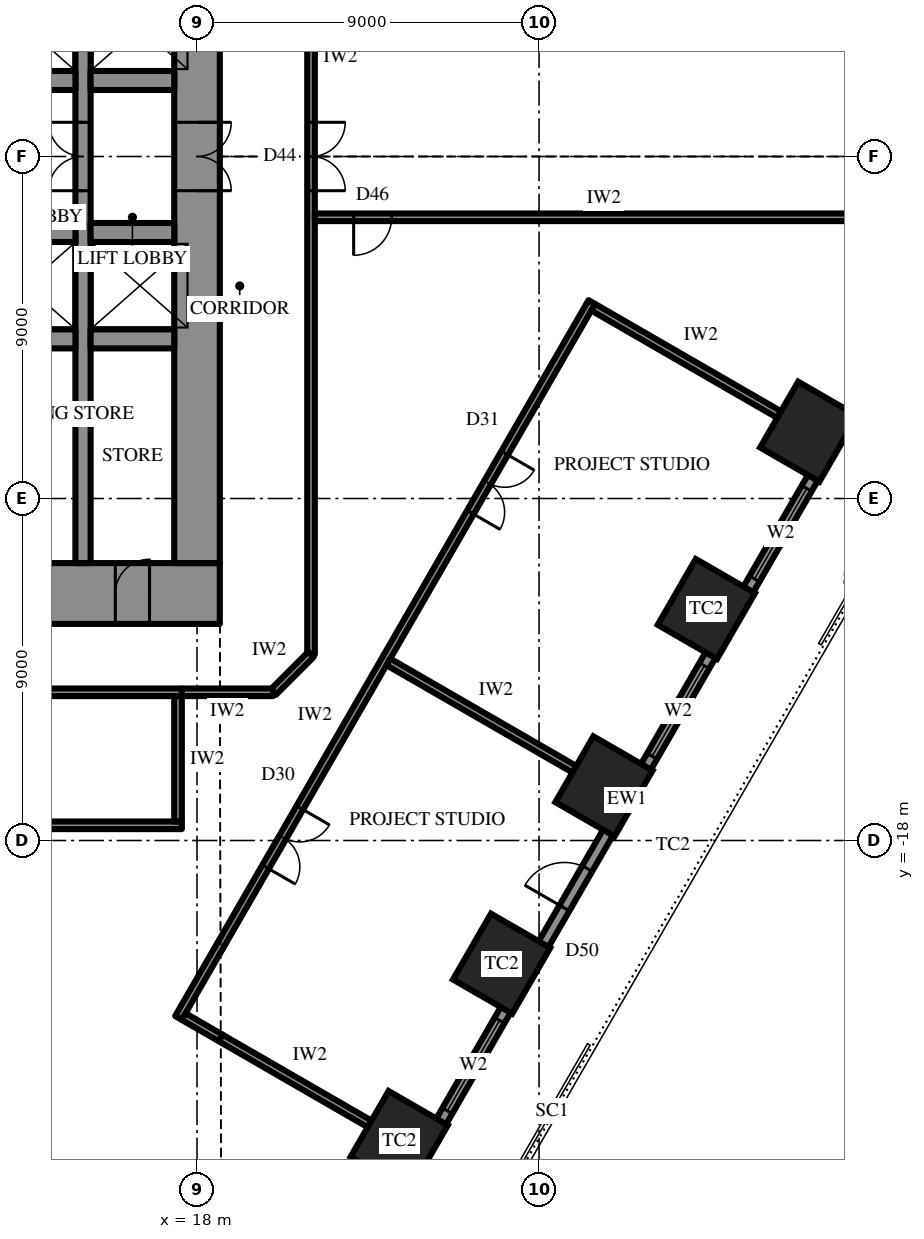
"""IFC4 building model, lengths in metres.
Left out: names, types, materials, properties, quantities, classifications, styles, units other than length and angle.
Written with IfcOpenShell. Run it as: python <this file> out.ifc"""

import sys

from ifc_helpers import new_model, si_unit, direction, frame, frame_2d, origin, origin_2d, place, context, subcontext, project, spatial, rectangle, extrude, element, fill, save


model = new_model("IFC4")
c1 = context("Model", 3, precision=1e-05, world=origin(), true_north=direction((0.0, 1.0)))
c2 = subcontext(c1, "Body", "Model", "MODEL_VIEW")
j1 = project(units=[si_unit("LENGTHUNIT", "METRE"), si_unit("PLANEANGLEUNIT", "RADIAN")], contexts=[c1])
p1 = place(None, origin())
s1 = spatial("IfcSite", under=j1, at=p1, CompositionType="ELEMENT")
p2 = place(p1, origin())
s2 = spatial("IfcBuilding", under=s1, at=p2, CompositionType="ELEMENT")
p3 = place(p2, frame((0.0, 0.0, 52.9)))
s3 = spatial("IfcBuildingStorey", under=s2, at=p3, CompositionType="ELEMENT", Elevation=52.9)
for number, where, z_axis, x_axis in (
    (1, (23.32, -25.908, 0.0), (0.0, 0.0, 1.0), (0.5, 0.866, 0.0)),
    (2, (26.014, -21.242, 0.0), (0.0, 0.0, 1.0), (0.5, 0.866, 0.0)),
    (3, (28.709, -16.575, 0.0), (0.0, 0.0, 1.0), (0.5, 0.866, 0.0)),
    (4, (31.403, -11.908, 0.0), (0.0, 0.0, 1.0), (0.5, 0.866, 0.0)),
    (5, (34.097, -7.242, 0.0), (0.0, 0.0, 1.0), (0.5, 0.866, 0.0)),
):
    element("IfcColumn", number, at=place(p3, frame(where, z_axis=z_axis, x_axis=x_axis)), inside=s3, PredefinedType="COLUMN", context=c2, shape_type="SweptSolid", body=[
        extrude(rectangle(XDim=2.0, YDim=1.8, at=origin_2d()), origin(), (0.0, 0.0, 1.0), 4.2),
    ])
p4 = place(p3, frame((18.6, -11.5, 0.0), z_axis=(0.0, 0.0, 1.0), x_axis=(-1.0, 0.0, 0.0)))
e6 = element("IfcWall", 6, at=p4, inside=s3, PredefinedType="SHEAR", context=c2, shape_type="SweptSolid", body=[
    extrude(rectangle(XDim=37.2, YDim=1.6, at=frame_2d((18.6, 0.0))), origin(), (0.0, 0.0, 1.0), 4.2),
])
p5 = place(p4, frame((19.45, 0.0, 0.0)))
e7 = element("IfcOpeningElement", 7, at=p5, cuts=e6, PredefinedType="OPENING", context=c2, shape_type="SweptSolid", body=[
    extrude(rectangle(XDim=0.9, YDim=2.2, at=frame_2d((0.45, 1.1))), frame((0.0, 0.81, 0.0), z_axis=(0.0, -1.0, 0.0), x_axis=(1.0, 0.0, 0.0)), (0.0, 0.0, 1.0), 1.62),
])
p6 = place(p4, frame((22.45, 0.0, 0.0)))
e8 = element("IfcOpeningElement", 8, at=p6, cuts=e6, PredefinedType="OPENING", context=c2, shape_type="SweptSolid", body=[
    extrude(rectangle(XDim=0.9, YDim=2.2, at=frame_2d((0.45, 1.1))), frame((0.0, 0.81, 0.0), z_axis=(0.0, -1.0, 0.0), x_axis=(1.0, 0.0, 0.0)), (0.0, 0.0, 1.0), 1.62),
])
p7 = place(p4, frame((25.5, 0.0, 0.0)))
e9 = element("IfcOpeningElement", 9, at=p7, cuts=e6, PredefinedType="OPENING", context=c2, shape_type="SweptSolid", body=[
    extrude(rectangle(XDim=1.0, YDim=2.2, at=frame_2d((0.5, 1.1))), frame((0.0, 0.81, 0.0), z_axis=(0.0, -1.0, 0.0), x_axis=(1.0, 0.0, 0.0)), (0.0, 0.0, 1.0), 1.62),
])
p8 = place(p4, frame((1.85, 0.0, 0.0)))
e10 = element("IfcOpeningElement", 10, at=p8, cuts=e6, PredefinedType="OPENING", context=c2, shape_type="SweptSolid", body=[
    extrude(rectangle(XDim=0.9, YDim=2.2, at=frame_2d((0.45, 1.1))), frame((0.0, 0.81, 0.0), z_axis=(0.0, -1.0, 0.0), x_axis=(1.0, 0.0, 0.0)), (0.0, 0.0, 1.0), 1.62),
])
p9 = place(p4, frame((4.6, 0.0, 0.0)))
e11 = element("IfcOpeningElement", 11, at=p9, cuts=e6, PredefinedType="OPENING", context=c2, shape_type="SweptSolid", body=[
    extrude(rectangle(XDim=0.9, YDim=2.2, at=frame_2d((0.45, 1.1))), frame((0.0, 0.81, 0.0), z_axis=(0.0, -1.0, 0.0), x_axis=(1.0, 0.0, 0.0)), (0.0, 0.0, 1.0), 1.62),
])
p10 = place(p4, frame((7.75, 0.0, 0.0)))
e12 = element("IfcOpeningElement", 12, at=p10, cuts=e6, PredefinedType="OPENING", context=c2, shape_type="SweptSolid", body=[
    extrude(rectangle(XDim=0.9, YDim=2.2, at=frame_2d((0.45, 1.1))), frame((0.0, 0.81, 0.0), z_axis=(0.0, -1.0, 0.0), x_axis=(1.0, 0.0, 0.0)), (0.0, 0.0, 1.0), 1.62),
])
p11 = place(p4, frame((28.55, 0.0, 0.0)))
e13 = element("IfcOpeningElement", 13, at=p11, cuts=e6, PredefinedType="OPENING", context=c2, shape_type="SweptSolid", body=[
    extrude(rectangle(XDim=0.9, YDim=2.2, at=frame_2d((0.45, 1.1))), frame((0.0, 0.81, 0.0), z_axis=(0.0, -1.0, 0.0), x_axis=(1.0, 0.0, 0.0)), (0.0, 0.0, 1.0), 1.62),
])
p12 = place(p4, frame((31.7, 0.0, 0.0)))
e14 = element("IfcOpeningElement", 14, at=p12, cuts=e6, PredefinedType="OPENING", context=c2, shape_type="SweptSolid", body=[
    extrude(rectangle(XDim=0.9, YDim=2.2, at=frame_2d((0.45, 1.1))), frame((0.0, 0.81, 0.0), z_axis=(0.0, -1.0, 0.0), x_axis=(1.0, 0.0, 0.0)), (0.0, 0.0, 1.0), 1.62),
])
p13 = place(p4, frame((34.45, 0.0, 0.0)))
e15 = element("IfcOpeningElement", 15, at=p13, cuts=e6, PredefinedType="OPENING", context=c2, shape_type="SweptSolid", body=[
    extrude(rectangle(XDim=0.9, YDim=2.2, at=frame_2d((0.45, 1.1))), frame((0.0, 0.81, 0.0), z_axis=(0.0, -1.0, 0.0), x_axis=(1.0, 0.0, 0.0)), (0.0, 0.0, 1.0), 1.62),
])
p14 = place(p3, frame((18.0, -10.7, 0.0), z_axis=(0.0, 0.0, 1.0), x_axis=(0.0, 1.0, 0.0)))
e16 = element("IfcWall", 16, at=p14, inside=s3, PredefinedType="SHEAR", context=c2, shape_type="SweptSolid", body=[
    extrude(rectangle(XDim=21.4, YDim=1.2, at=frame_2d((10.7, 0.0))), origin(), (0.0, 0.0, 1.0), 4.2),
])
p15 = place(p14, frame((9.8, 0.0, 0.0)))
e17 = element("IfcOpeningElement", 17, at=p15, cuts=e16, PredefinedType="OPENING", context=c2, shape_type="SweptSolid", body=[
    extrude(rectangle(XDim=1.8, YDim=2.4, at=frame_2d((0.9, 1.2))), frame((0.0, 0.61, 0.0), z_axis=(0.0, -1.0, 0.0), x_axis=(1.0, 0.0, 0.0)), (0.0, 0.0, 1.0), 1.22),
])
p16 = place(p3, frame((15.0, -10.7, 0.0), z_axis=(0.0, 0.0, 1.0), x_axis=(0.0, 1.0, 0.0)))
e18 = element("IfcWall", 18, at=p16, inside=s3, PredefinedType="SHEAR", context=c2, shape_type="SweptSolid", body=[
    extrude(rectangle(XDim=21.4, YDim=0.4, at=frame_2d((10.7, 0.0))), origin(), (0.0, 0.0, 1.0), 4.2),
])
p17 = place(p16, frame((9.8, 0.0, 0.0)))
e19 = element("IfcOpeningElement", 19, at=p17, cuts=e18, PredefinedType="OPENING", context=c2, shape_type="SweptSolid", body=[
    extrude(rectangle(XDim=1.8, YDim=2.4, at=frame_2d((0.9, 1.2))), frame((0.0, 0.21, 0.0), z_axis=(0.0, -1.0, 0.0), x_axis=(1.0, 0.0, 0.0)), (0.0, 0.0, 1.0), 0.42),
])
p18 = place(p3, frame((12.3, 2.0, 0.0), z_axis=(0.0, 0.0, 1.0), x_axis=(1.0, 0.0, 0.0)))
e20 = element("IfcWall", 20, at=p18, inside=s3, PredefinedType="SHEAR", context=c2, shape_type="SweptSolid", body=[
    extrude(rectangle(XDim=2.5, YDim=0.5, at=frame_2d((1.25, 0.0))), origin(), (0.0, 0.0, 1.0), 4.2),
])
for number, where, z_axis, x_axis in (
    (21, (15.2, 2.0, 0.0), (0.0, 0.0, 1.0), (1.0, 0.0, 0.0)),
    (22, (17.4, -2.0, 0.0), (0.0, 0.0, 1.0), (-1.0, 0.0, 0.0)),
):
    element("IfcWall", number, at=place(p3, frame(where, z_axis=z_axis, x_axis=x_axis)), inside=s3, PredefinedType="SHEAR", context=c2, shape_type="SweptSolid", body=[
        extrude(rectangle(XDim=2.2, YDim=0.5, at=frame_2d((1.1, 0.0))), origin(), (0.0, 0.0, 1.0), 4.2),
    ])
p19 = place(p3, frame((14.8, -2.0, 0.0), z_axis=(0.0, 0.0, 1.0), x_axis=(-1.0, 0.0, 0.0)))
e23 = element("IfcWall", 23, at=p19, inside=s3, PredefinedType="SHEAR", context=c2, shape_type="SweptSolid", body=[
    extrude(rectangle(XDim=2.5, YDim=0.5, at=frame_2d((1.25, 0.0))), origin(), (0.0, 0.0, 1.0), 4.2),
])
p20 = place(p3, frame((17.4, -4.8, 0.0), z_axis=(0.0, 0.0, 1.0), x_axis=(-1.0, 0.0, 0.0)))
e24 = element("IfcWall", 24, at=p20, inside=s3, PredefinedType="SHEAR", context=c2, shape_type="SweptSolid", body=[
    extrude(rectangle(XDim=2.2, YDim=0.5, at=frame_2d((1.1, 0.0))), origin(), (0.0, 0.0, 1.0), 4.2),
])
p21 = place(p3, frame((14.8, -4.8, 0.0), z_axis=(0.0, 0.0, 1.0), x_axis=(-1.0, 0.0, 0.0)))
e25 = element("IfcWall", 25, at=p21, inside=s3, PredefinedType="SHEAR", context=c2, shape_type="SweptSolid", body=[
    extrude(rectangle(XDim=2.5, YDim=0.5, at=frame_2d((1.25, 0.0))), origin(), (0.0, 0.0, 1.0), 4.2),
])
p22 = place(p3, frame((21.232, -30.925, 0.0), z_axis=(0.0, 0.0, 1.0), x_axis=(0.499999163675, 0.866025886636, 0.0)))
e26 = element("IfcWall", 26, at=p22, inside=s3, PredefinedType="SOLIDWALL", context=c2, shape_type="SweptSolid", body=[
    extrude(rectangle(XDim=32.332, YDim=0.3, at=frame_2d((16.166, 0.0))), origin(), (0.0, 0.0, 1.0), 2.7),
])
p23 = place(p22, frame((1.319, 0.0, 0.6)))
e27 = element("IfcOpeningElement", 27, at=p23, cuts=e26, PredefinedType="OPENING", context=c2, shape_type="SweptSolid", body=[
    extrude(rectangle(XDim=2.75, YDim=1.85, at=frame_2d((1.375, 0.925))), frame((0.0, 0.16, 0.0), z_axis=(0.0, -1.0, 0.0), x_axis=(1.0, 0.0, 0.0)), (0.0, 0.0, 1.0), 0.32),
])
p24 = place(p22, frame((6.708, 0.0, 0.6)))
e28 = element("IfcOpeningElement", 28, at=p24, cuts=e26, PredefinedType="OPENING", context=c2, shape_type="SweptSolid", body=[
    extrude(rectangle(XDim=2.75, YDim=1.85, at=frame_2d((1.375, 0.925))), frame((0.0, 0.16, 0.0), z_axis=(0.0, -1.0, 0.0), x_axis=(1.0, 0.0, 0.0)), (0.0, 0.0, 1.0), 0.32),
])
p25 = place(p22, frame((12.872, 0.0, 0.0)))
e29 = element("IfcOpeningElement", 29, at=p25, cuts=e26, PredefinedType="OPENING", context=c2, shape_type="SweptSolid", body=[
    extrude(rectangle(XDim=1.2, YDim=2.4, at=frame_2d((0.6, 1.2))), frame((0.0, 0.16, 0.0), z_axis=(0.0, -1.0, 0.0), x_axis=(1.0, 0.0, 0.0)), (0.0, 0.0, 1.0), 0.32),
])
p26 = place(p22, frame((17.485, 0.0, 0.6)))
e30 = element("IfcOpeningElement", 30, at=p26, cuts=e26, PredefinedType="OPENING", context=c2, shape_type="SweptSolid", body=[
    extrude(rectangle(XDim=2.75, YDim=1.85, at=frame_2d((1.375, 0.925))), frame((0.0, 0.16, 0.0), z_axis=(0.0, -1.0, 0.0), x_axis=(1.0, 0.0, 0.0)), (0.0, 0.0, 1.0), 0.32),
])
p27 = place(p22, frame((22.874, 0.0, 0.6)))
e31 = element("IfcOpeningElement", 31, at=p27, cuts=e26, PredefinedType="OPENING", context=c2, shape_type="SweptSolid", body=[
    extrude(rectangle(XDim=2.75, YDim=1.85, at=frame_2d((1.375, 0.925))), frame((0.0, 0.16, 0.0), z_axis=(0.0, -1.0, 0.0), x_axis=(1.0, 0.0, 0.0)), (0.0, 0.0, 1.0), 0.32),
])
p28 = place(p22, frame((28.262, 0.0, 0.6)))
e32 = element("IfcOpeningElement", 32, at=p28, cuts=e26, PredefinedType="OPENING", context=c2, shape_type="SweptSolid", body=[
    extrude(rectangle(XDim=2.75, YDim=1.85, at=frame_2d((1.375, 0.925))), frame((0.0, 0.16, 0.0), z_axis=(0.0, -1.0, 0.0), x_axis=(1.0, 0.0, 0.0)), (0.0, 0.0, 1.0), 0.32),
])
p29 = place(p3, frame((17.6, -14.1, 0.0), z_axis=(0.0, 0.0, 1.0), x_axis=(-1.0, 0.0, 0.0)))
e33 = element("IfcWall", 33, at=p29, inside=s3, PredefinedType="PARTITIONING", context=c2, shape_type="SweptSolid", body=[
    extrude(rectangle(XDim=35.2, YDim=0.2, at=frame_2d((17.6, 0.0))), origin(), (0.0, 0.0, 1.0), 4.0),
])
p30 = place(p3, frame((17.6, -17.6, 0.0), z_axis=(0.0, 0.0, 1.0), x_axis=(-1.0, 0.0, 0.0)))
e34 = element("IfcWall", 34, at=p30, inside=s3, PredefinedType="PARTITIONING", context=c2, shape_type="SweptSolid", body=[
    extrude(rectangle(XDim=35.2, YDim=0.2, at=frame_2d((17.6, 0.0))), origin(), (0.0, 0.0, 1.0), 4.0),
])
p31 = place(p30, frame((16.7, 0.0, 0.0)))
e35 = element("IfcOpeningElement", 35, at=p31, cuts=e34, PredefinedType="OPENING", context=c2, shape_type="SweptSolid", body=[
    extrude(rectangle(XDim=1.8, YDim=2.4, at=frame_2d((0.9, 1.2))), frame((0.0, 0.11, 0.0), z_axis=(0.0, -1.0, 0.0), x_axis=(1.0, 0.0, 0.0)), (0.0, 0.0, 1.0), 0.22),
])
p32 = place(p3, frame((17.5, -14.2, 0.0), z_axis=(0.0, 0.0, 1.0), x_axis=(0.0, -1.0, 0.0)))
e36 = element("IfcWall", 36, at=p32, inside=s3, PredefinedType="PARTITIONING", context=c2, shape_type="SweptSolid", body=[
    extrude(rectangle(XDim=3.3, YDim=0.2, at=frame_2d((1.65, 0.0))), origin(), (0.0, 0.0, 1.0), 4.0),
])
p33 = place(p3, frame((17.511, -22.67, 0.0), z_axis=(0.0, 0.0, 1.0), x_axis=(0.500000289772, 0.866025236485, 0.0)))
e37 = element("IfcWall", 37, at=p33, inside=s3, PredefinedType="PARTITIONING", context=c2, shape_type="SweptSolid", body=[
    extrude(rectangle(XDim=21.754, YDim=0.2, at=frame_2d((10.877, 0.0))), origin(), (0.0, 0.0, 1.0), 4.0),
])
p34 = place(p33, frame((4.589, 0.0, 0.0)))
e38 = element("IfcOpeningElement", 38, at=p34, cuts=e37, PredefinedType="OPENING", context=c2, shape_type="SweptSolid", body=[
    extrude(rectangle(XDim=1.8, YDim=2.4, at=frame_2d((0.9, 1.2))), frame((0.0, 0.11, 0.0), z_axis=(0.0, -1.0, 0.0), x_axis=(1.0, 0.0, 0.0)), (0.0, 0.0, 1.0), 0.22),
])
p35 = place(p33, frame((15.366, 0.0, 0.0)))
e39 = element("IfcOpeningElement", 39, at=p35, cuts=e37, PredefinedType="OPENING", context=c2, shape_type="SweptSolid", body=[
    extrude(rectangle(XDim=1.8, YDim=2.4, at=frame_2d((0.9, 1.2))), frame((0.0, 0.11, 0.0), z_axis=(0.0, -1.0, 0.0), x_axis=(1.0, 0.0, 0.0)), (0.0, 0.0, 1.0), 0.22),
])
p36 = place(p3, frame((17.648, -22.633, 0.0), z_axis=(0.0, 0.0, 1.0), x_axis=(0.86603400694, -0.499985098601, 0.0)))
e40 = element("IfcWall", 40, at=p36, inside=s3, PredefinedType="PARTITIONING", context=c2, shape_type="SweptSolid", body=[
    extrude(rectangle(XDim=1.126, YDim=0.2, at=frame_2d((0.563, 0.0))), origin(), (0.0, 0.0, 1.0), 4.0),
])
p37 = place(p3, frame((18.623, -23.197, 0.0), z_axis=(0.0, 0.0, 1.0), x_axis=(0.866029199568, -0.499993425452, 0.0)))
e41 = element("IfcWall", 41, at=p37, inside=s3, PredefinedType="PARTITIONING", context=c2, shape_type="SweptSolid", body=[
    extrude(rectangle(XDim=4.523, YDim=0.2, at=frame_2d((2.262, 0.0))), origin(), (0.0, 0.0, 1.0), 2.992),
])
p38 = place(p3, frame((23.036, -13.3, 0.0), z_axis=(0.0, 0.0, 1.0), x_axis=(0.866019355129, -0.500010476433, 0.0)))
e42 = element("IfcWall", 42, at=p38, inside=s3, PredefinedType="PARTITIONING", context=c2, shape_type="SweptSolid", body=[
    extrude(rectangle(XDim=5.65, YDim=0.2, at=frame_2d((2.825, 0.0))), origin(), (0.0, 0.0, 1.0), 4.0),
])
p39 = place(p3, frame((28.425, -3.967, 0.0), z_axis=(0.0, 0.0, 1.0), x_axis=(0.866011447264, -0.500024172624, 0.0)))
e43 = element("IfcWall", 43, at=p39, inside=s3, PredefinedType="PARTITIONING", context=c2, shape_type="SweptSolid", body=[
    extrude(rectangle(XDim=5.65, YDim=0.2, at=frame_2d((2.825, 0.0))), origin(), (0.0, 0.0, 1.0), 2.944),
])
p40 = place(p3, frame((21.0, 13.1, 0.0), z_axis=(0.0, 0.0, 1.0), x_axis=(0.0, -1.0, 0.0)))
e44 = element("IfcWall", 44, at=p40, inside=s3, PredefinedType="PARTITIONING", context=c2, shape_type="SweptSolid", body=[
    extrude(rectangle(XDim=26.2, YDim=0.2, at=frame_2d((13.1, 0.0))), origin(), (0.0, 0.0, 1.0), 4.0),
])
p41 = place(p40, frame((12.2, 0.0, 0.0)))
e45 = element("IfcOpeningElement", 45, at=p41, cuts=e44, PredefinedType="OPENING", context=c2, shape_type="SweptSolid", body=[
    extrude(rectangle(XDim=1.8, YDim=2.4, at=frame_2d((0.9, 1.2))), frame((0.0, 0.11, 0.0), z_axis=(0.0, -1.0, 0.0), x_axis=(1.0, 0.0, 0.0)), (0.0, 0.0, 1.0), 0.22),
])
p42 = place(p3, frame((21.0, -13.1, 0.0), z_axis=(0.0, 0.0, 1.0), x_axis=(-0.707106781187, -0.707106781187, 0.0)))
e46 = element("IfcWall", 46, at=p42, inside=s3, PredefinedType="PARTITIONING", context=c2, shape_type="SweptSolid", body=[
    extrude(rectangle(XDim=1.414, YDim=0.2, at=frame_2d((0.707, 0.0))), origin(), (0.0, 0.0, 1.0), 4.0),
])
p43 = place(p3, frame((20.0, -14.1, 0.0), z_axis=(0.0, 0.0, 1.0), x_axis=(-1.0, 0.0, 0.0)))
e47 = element("IfcWall", 47, at=p43, inside=s3, PredefinedType="PARTITIONING", context=c2, shape_type="SweptSolid", body=[
    extrude(rectangle(XDim=2.4, YDim=0.2, at=frame_2d((1.2, 0.0))), origin(), (0.0, 0.0, 1.0), 4.0),
])
p44 = place(p3, frame((21.1, -1.6, 0.0), z_axis=(0.0, 0.0, 1.0), x_axis=(1.0, 0.0, 0.0)))
e48 = element("IfcWall", 48, at=p44, inside=s3, PredefinedType="PARTITIONING", context=c2, shape_type="SweptSolid", body=[
    extrude(rectangle(XDim=15.215, YDim=0.2, at=frame_2d((7.608, 0.0))), origin(), (0.0, 0.0, 1.0), 4.0),
])
p45 = place(p44, frame((1.021, 0.0, 0.0)))
e49 = element("IfcOpeningElement", 49, at=p45, cuts=e48, PredefinedType="OPENING", context=c2, shape_type="SweptSolid", body=[
    extrude(rectangle(XDim=1.0, YDim=2.2, at=frame_2d((0.5, 1.1))), frame((0.0, 0.11, 0.0), z_axis=(0.0, -1.0, 0.0), x_axis=(1.0, 0.0, 0.0)), (0.0, 0.0, 1.0), 0.22),
])
p46 = place(p24, origin())
e50 = element("IfcWindow", 50, at=p46, inside=s3, PartitioningType="SINGLE_PANEL", PredefinedType="WINDOW", context=c2, shape_type="SweptSolid", body=[
    extrude(rectangle(XDim=2.75, YDim=1.85, at=frame_2d((1.375, 0.925))), frame((0.0, 0.03, 0.0), z_axis=(0.0, -1.0, 0.0), x_axis=(1.0, 0.0, 0.0)), (0.0, 0.0, 1.0), 0.06),
])
fill(e28, e50)
p47 = place(p25, origin())
e51 = element("IfcDoor", 51, at=p47, inside=s3, OperationType="SINGLE_SWING_RIGHT", PredefinedType="DOOR", context=c2, shape_type="SweptSolid", body=[
    extrude(rectangle(XDim=1.2, YDim=2.4, at=frame_2d((0.6, 1.2))), frame((0.0, 0.025, 0.0), z_axis=(0.0, -1.0, 0.0), x_axis=(1.0, 0.0, 0.0)), (0.0, 0.0, 1.0), 0.05),
])
fill(e29, e51)
p48 = place(p26, origin())
e52 = element("IfcWindow", 52, at=p48, inside=s3, PartitioningType="SINGLE_PANEL", PredefinedType="WINDOW", context=c2, shape_type="SweptSolid", body=[
    extrude(rectangle(XDim=2.75, YDim=1.85, at=frame_2d((1.375, 0.925))), frame((0.0, 0.03, 0.0), z_axis=(0.0, -1.0, 0.0), x_axis=(1.0, 0.0, 0.0)), (0.0, 0.0, 1.0), 0.06),
])
fill(e30, e52)
p49 = place(p27, origin())
e53 = element("IfcWindow", 53, at=p49, inside=s3, PartitioningType="SINGLE_PANEL", PredefinedType="WINDOW", context=c2, shape_type="SweptSolid", body=[
    extrude(rectangle(XDim=2.75, YDim=1.85, at=frame_2d((1.375, 0.925))), frame((0.0, 0.03, 0.0), z_axis=(0.0, -1.0, 0.0), x_axis=(1.0, 0.0, 0.0)), (0.0, 0.0, 1.0), 0.06),
])
fill(e31, e53)
p50 = place(p15, frame((1.8, 0.0, 0.0), z_axis=(0.0, 0.0, 1.0), x_axis=(-1.0, 0.0, 0.0)))
e54 = element("IfcDoor", 54, at=p50, inside=s3, OperationType="DOUBLE_DOOR_SINGLE_SWING", PredefinedType="DOOR", context=c2, shape_type="SweptSolid", body=[
    extrude(rectangle(XDim=1.8, YDim=2.4, at=frame_2d((0.9, 1.2))), frame((0.0, 0.025, 0.0), z_axis=(0.0, -1.0, 0.0), x_axis=(1.0, 0.0, 0.0)), (0.0, 0.0, 1.0), 0.05),
])
fill(e17, e54)
p51 = place(p8, frame((0.9, 0.0, 0.0), z_axis=(0.0, 0.0, 1.0), x_axis=(-1.0, 0.0, 0.0)))
e55 = element("IfcDoor", 55, at=p51, inside=s3, OperationType="SINGLE_SWING_LEFT", PredefinedType="DOOR", context=c2, shape_type="SweptSolid", body=[
    extrude(rectangle(XDim=0.9, YDim=2.2, at=frame_2d((0.45, 1.1))), frame((0.0, 0.025, 0.0), z_axis=(0.0, -1.0, 0.0), x_axis=(1.0, 0.0, 0.0)), (0.0, 0.0, 1.0), 0.05),
])
fill(e10, e55)
p52 = place(p17, origin())
e56 = element("IfcDoor", 56, at=p52, inside=s3, OperationType="DOUBLE_DOOR_SINGLE_SWING", PredefinedType="DOOR", context=c2, shape_type="SweptSolid", body=[
    extrude(rectangle(XDim=1.8, YDim=2.4, at=frame_2d((0.9, 1.2))), frame((0.0, 0.025, 0.0), z_axis=(0.0, -1.0, 0.0), x_axis=(1.0, 0.0, 0.0)), (0.0, 0.0, 1.0), 0.05),
])
fill(e19, e56)
p53 = place(p34, frame((1.8, 0.0, 0.0), z_axis=(0.0, 0.0, 1.0), x_axis=(-1.0, 0.0, 0.0)))
e57 = element("IfcDoor", 57, at=p53, inside=s3, OperationType="DOUBLE_DOOR_SINGLE_SWING", PredefinedType="DOOR", context=c2, shape_type="SweptSolid", body=[
    extrude(rectangle(XDim=1.8, YDim=2.4, at=frame_2d((0.9, 1.2))), frame((0.0, 0.025, 0.0), z_axis=(0.0, -1.0, 0.0), x_axis=(1.0, 0.0, 0.0)), (0.0, 0.0, 1.0), 0.05),
])
fill(e38, e57)
p54 = place(p35, frame((1.8, 0.0, 0.0), z_axis=(0.0, 0.0, 1.0), x_axis=(-1.0, 0.0, 0.0)))
e58 = element("IfcDoor", 58, at=p54, inside=s3, OperationType="DOUBLE_DOOR_SINGLE_SWING", PredefinedType="DOOR", context=c2, shape_type="SweptSolid", body=[
    extrude(rectangle(XDim=1.8, YDim=2.4, at=frame_2d((0.9, 1.2))), frame((0.0, 0.025, 0.0), z_axis=(0.0, -1.0, 0.0), x_axis=(1.0, 0.0, 0.0)), (0.0, 0.0, 1.0), 0.05),
])
fill(e39, e58)
p55 = place(p41, origin())
e59 = element("IfcDoor", 59, at=p55, inside=s3, OperationType="DOUBLE_DOOR_SINGLE_SWING", PredefinedType="DOOR", context=c2, shape_type="SweptSolid", body=[
    extrude(rectangle(XDim=1.8, YDim=2.4, at=frame_2d((0.9, 1.2))), frame((0.0, 0.025, 0.0), z_axis=(0.0, -1.0, 0.0), x_axis=(1.0, 0.0, 0.0)), (0.0, 0.0, 1.0), 0.05),
])
fill(e45, e59)
p56 = place(p45, frame((1.0, 0.0, 0.0), z_axis=(0.0, 0.0, 1.0), x_axis=(-1.0, 0.0, 0.0)))
e60 = element("IfcDoor", 60, at=p56, inside=s3, OperationType="SINGLE_SWING_LEFT", PredefinedType="DOOR", context=c2, shape_type="SweptSolid", body=[
    extrude(rectangle(XDim=1.0, YDim=2.2, at=frame_2d((0.5, 1.1))), frame((0.0, 0.025, 0.0), z_axis=(0.0, -1.0, 0.0), x_axis=(1.0, 0.0, 0.0)), (0.0, 0.0, 1.0), 0.05),
])
fill(e49, e60)
save(model, sys.argv[1])
